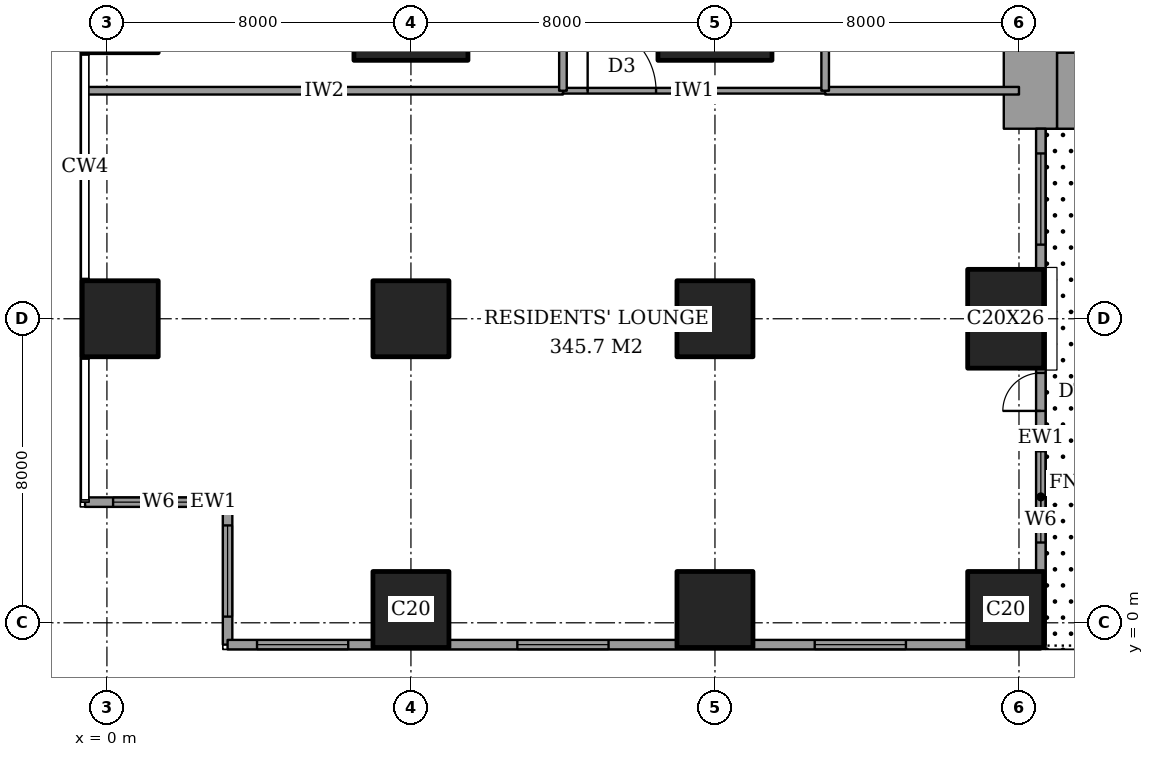
"""IFC4 building model, lengths in metres.
Left out: names, types, materials, properties, quantities, classifications, styles, units other than length and angle.
Written with IfcOpenShell. Run it as: python <this file> out.ifc"""

import sys

from ifc_helpers import new_model, si_unit, direction, frame, frame_2d, origin, origin_2d, place, context, subcontext, project, spatial, rectangle, extrude, element, fill, save


model = new_model("IFC4")
c1 = context("Model", 3, precision=1e-05, world=origin(), true_north=direction((0.0, 1.0)))
c2 = subcontext(c1, "Body", "Model", "MODEL_VIEW")
j1 = project(units=[si_unit("LENGTHUNIT", "METRE"), si_unit("PLANEANGLEUNIT", "RADIAN")], contexts=[c1])
p1 = place(None, origin())
s1 = spatial("IfcSite", under=j1, at=p1, CompositionType="ELEMENT")
p2 = place(p1, origin())
s2 = spatial("IfcBuilding", under=s1, at=p2, CompositionType="ELEMENT")
p3 = place(p2, frame((0.0, 0.0, 26.0)))
s3 = spatial("IfcBuildingStorey", under=s2, at=p3, CompositionType="ELEMENT", Elevation=26.0)
for number, where, z_axis, x_axis in (
    (1, (0.35, 8.0, 0.0), (0.0, 0.0, 1.0), (1.0, 0.0, 0.0)),
    (2, (8.0, 0.35, 0.0), (0.0, 0.0, 1.0), (1.0, 0.0, 0.0)),
    (3, (8.0, 8.0, 0.0), (0.0, 0.0, 1.0), (1.0, 0.0, 0.0)),
):
    element("IfcColumn", number, at=place(p3, frame(where, z_axis=z_axis, x_axis=x_axis)), inside=s3, PredefinedType="COLUMN", context=c2, shape_type="SweptSolid", body=[
        extrude(rectangle(XDim=2.0, YDim=2.0, at=origin_2d()), origin(), (0.0, 0.0, 1.0), 3.6),
    ])
p4 = place(p3, frame((8.0, 16.0, 0.0), z_axis=(0.0, 0.0, 1.0), x_axis=(1.0, 0.0, 0.0)))
e4 = element("IfcColumn", 4, at=p4, inside=s3, PredefinedType="COLUMN", context=c2, shape_type="SweptSolid", body=[
    extrude(rectangle(XDim=3.0, YDim=2.4, at=origin_2d()), origin(), (0.0, 0.0, 1.0), 3.6),
])
for number, where, z_axis, x_axis in (
    (5, (16.0, 0.35, 0.0), (0.0, 0.0, 1.0), (1.0, 0.0, 0.0)),
    (6, (16.0, 8.0, 0.0), (0.0, 0.0, 1.0), (1.0, 0.0, 0.0)),
):
    element("IfcColumn", number, at=place(p3, frame(where, z_axis=z_axis, x_axis=x_axis)), inside=s3, PredefinedType="COLUMN", context=c2, shape_type="SweptSolid", body=[
        extrude(rectangle(XDim=2.0, YDim=2.0, at=origin_2d()), origin(), (0.0, 0.0, 1.0), 3.6),
    ])
p5 = place(p3, frame((16.0, 16.0, 0.0), z_axis=(0.0, 0.0, 1.0), x_axis=(1.0, 0.0, 0.0)))
e7 = element("IfcColumn", 7, at=p5, inside=s3, PredefinedType="COLUMN", context=c2, shape_type="SweptSolid", body=[
    extrude(rectangle(XDim=3.0, YDim=2.4, at=origin_2d()), origin(), (0.0, 0.0, 1.0), 3.6),
])
p6 = place(p3, frame((23.65, 0.35, 0.0), z_axis=(0.0, 0.0, 1.0), x_axis=(1.0, 0.0, 0.0)))
e8 = element("IfcColumn", 8, at=p6, inside=s3, PredefinedType="COLUMN", context=c2, shape_type="SweptSolid", body=[
    extrude(rectangle(XDim=2.0, YDim=2.0, at=origin_2d()), origin(), (0.0, 0.0, 1.0), 3.6),
])
p7 = place(p3, frame((23.65, 8.0, 0.0), z_axis=(0.0, 0.0, 1.0), x_axis=(1.0, 0.0, 0.0)))
e9 = element("IfcColumn", 9, at=p7, inside=s3, PredefinedType="COLUMN", context=c2, shape_type="SweptSolid", body=[
    extrude(rectangle(XDim=2.0, YDim=2.6, at=origin_2d()), origin(), (0.0, 0.0, 1.0), 3.6),
])
p8 = place(p3, frame((25.0, 14.0, 0.0), z_axis=(0.0, 0.0, 1.0), x_axis=(1.0, 0.0, 0.0)))
e10 = element("IfcWall", 10, at=p8, inside=s3, PredefinedType="SHEAR", context=c2, shape_type="SweptSolid", body=[
    extrude(rectangle(XDim=3.15, YDim=2.0, at=frame_2d((1.575, 0.0))), origin(), (0.0, 0.0, 1.0), 3.6),
])
p9 = place(p3, frame((24.3, 13.0, 0.0), z_axis=(0.0, 0.0, 1.0), x_axis=(0.0, 1.0, 0.0)))
e11 = element("IfcWall", 11, at=p9, inside=s3, PredefinedType="SHEAR", context=c2, shape_type="SweptSolid", body=[
    extrude(rectangle(XDim=10.15, YDim=1.4, at=frame_2d((5.075, 0.0))), origin(), (0.0, 0.0, 1.0), 3.6),
])
p10 = place(p3, frame((24.575, -0.575, 0.0), z_axis=(0.0, 0.0, 1.0), x_axis=(0.0, 1.0, 0.0)))
e12 = element("IfcWall", 12, at=p10, inside=s3, PredefinedType="SOLIDWALL", context=c2, shape_type="SweptSolid", body=[
    extrude(rectangle(XDim=13.575, YDim=0.25, at=frame_2d((6.788, 0.0))), origin(), (0.0, 0.0, 1.0), 3.6),
])
p11 = place(p10, frame((6.15, 0.0, 0.0)))
e13 = element("IfcOpeningElement", 13, at=p11, cuts=e12, PredefinedType="OPENING", context=c2, shape_type="SweptSolid", body=[
    extrude(rectangle(XDim=1.0, YDim=2.4, at=frame_2d((0.5, 1.2))), frame((0.0, 0.135, 0.0), z_axis=(0.0, -1.0, 0.0), x_axis=(1.0, 0.0, 0.0)), (0.0, 0.0, 1.0), 0.27),
])
p12 = place(p10, frame((2.688, 0.0, 0.6)))
e14 = element("IfcOpeningElement", 14, at=p12, cuts=e12, PredefinedType="OPENING", context=c2, shape_type="SweptSolid", body=[
    extrude(rectangle(XDim=2.4, YDim=2.0, at=frame_2d((1.2, 1.0))), frame((0.0, 0.135, 0.0), z_axis=(0.0, -1.0, 0.0), x_axis=(1.0, 0.0, 0.0)), (0.0, 0.0, 1.0), 0.27),
])
p13 = place(p10, frame((10.525, 0.0, 0.6)))
e15 = element("IfcOpeningElement", 15, at=p13, cuts=e12, PredefinedType="OPENING", context=c2, shape_type="SweptSolid", body=[
    extrude(rectangle(XDim=2.4, YDim=2.0, at=frame_2d((1.2, 1.0))), frame((0.0, 0.135, 0.0), z_axis=(0.0, -1.0, 0.0), x_axis=(1.0, 0.0, 0.0)), (0.0, 0.0, 1.0), 0.27),
])
p14 = place(p3, frame((-0.575, 3.175, 0.0), z_axis=(0.0, 0.0, 1.0), x_axis=(1.0, 0.0, 0.0)))
e16 = element("IfcWall", 16, at=p14, inside=s3, PredefinedType="SOLIDWALL", context=c2, shape_type="SweptSolid", body=[
    extrude(rectangle(XDim=3.75, YDim=0.25, at=frame_2d((1.875, 0.0))), origin(), (0.0, 0.0, 1.0), 3.6),
])
p15 = place(p14, frame((0.738, 0.0, 0.6)))
e17 = element("IfcOpeningElement", 17, at=p15, cuts=e16, PredefinedType="OPENING", context=c2, shape_type="SweptSolid", body=[
    extrude(rectangle(XDim=2.4, YDim=2.0, at=frame_2d((1.2, 1.0))), frame((0.0, 0.135, 0.0), z_axis=(0.0, -1.0, 0.0), x_axis=(1.0, 0.0, 0.0)), (0.0, 0.0, 1.0), 0.27),
])
p16 = place(p3, frame((3.175, 3.175, 0.0), z_axis=(0.0, 0.0, 1.0), x_axis=(0.0, -1.0, 0.0)))
e18 = element("IfcWall", 18, at=p16, inside=s3, PredefinedType="SOLIDWALL", context=c2, shape_type="SweptSolid", body=[
    extrude(rectangle(XDim=3.75, YDim=0.25, at=frame_2d((1.875, 0.0))), origin(), (0.0, 0.0, 1.0), 3.6),
])
p17 = place(p16, frame((0.613, 0.0, 0.6)))
e19 = element("IfcOpeningElement", 19, at=p17, cuts=e18, PredefinedType="OPENING", context=c2, shape_type="SweptSolid", body=[
    extrude(rectangle(XDim=2.4, YDim=2.0, at=frame_2d((1.2, 1.0))), frame((0.0, 0.135, 0.0), z_axis=(0.0, -1.0, 0.0), x_axis=(1.0, 0.0, 0.0)), (0.0, 0.0, 1.0), 0.27),
])
p18 = place(p3, frame((3.175, -0.575, 0.0), z_axis=(0.0, 0.0, 1.0), x_axis=(1.0, 0.0, 0.0)))
e20 = element("IfcWall", 20, at=p18, inside=s3, PredefinedType="SOLIDWALL", context=c2, shape_type="SweptSolid", body=[
    extrude(rectangle(XDim=21.4, YDim=0.25, at=frame_2d((10.7, 0.0))), origin(), (0.0, 0.0, 1.0), 3.6),
])
p19 = place(p18, frame((0.775, 0.0, 0.6)))
e21 = element("IfcOpeningElement", 21, at=p19, cuts=e20, PredefinedType="OPENING", context=c2, shape_type="SweptSolid", body=[
    extrude(rectangle(XDim=2.4, YDim=2.0, at=frame_2d((1.2, 1.0))), frame((0.0, 0.135, 0.0), z_axis=(0.0, -1.0, 0.0), x_axis=(1.0, 0.0, 0.0)), (0.0, 0.0, 1.0), 0.27),
])
p20 = place(p18, frame((7.625, 0.0, 0.6)))
e22 = element("IfcOpeningElement", 22, at=p20, cuts=e20, PredefinedType="OPENING", context=c2, shape_type="SweptSolid", body=[
    extrude(rectangle(XDim=2.4, YDim=2.0, at=frame_2d((1.2, 1.0))), frame((0.0, 0.135, 0.0), z_axis=(0.0, -1.0, 0.0), x_axis=(1.0, 0.0, 0.0)), (0.0, 0.0, 1.0), 0.27),
])
p21 = place(p18, frame((15.45, 0.0, 0.6)))
e23 = element("IfcOpeningElement", 23, at=p21, cuts=e20, PredefinedType="OPENING", context=c2, shape_type="SweptSolid", body=[
    extrude(rectangle(XDim=2.4, YDim=2.0, at=frame_2d((1.2, 1.0))), frame((0.0, 0.135, 0.0), z_axis=(0.0, -1.0, 0.0), x_axis=(1.0, 0.0, 0.0)), (0.0, 0.0, 1.0), 0.27),
])
p22 = place(p3, frame((-0.561, 14.0, 0.0), z_axis=(0.0, 0.0, 1.0), x_axis=(1.0, 0.0, 0.0)))
e24 = element("IfcWall", 24, at=p22, inside=s3, PredefinedType="PARTITIONING", context=c2, shape_type="SweptSolid", body=[
    extrude(rectangle(XDim=12.561, YDim=0.2, at=frame_2d((6.281, 0.0))), origin(), (0.0, 0.0, 1.0), 3.35),
])
p23 = place(p3, frame((18.9, 14.0, 0.0), z_axis=(0.0, 0.0, 1.0), x_axis=(1.0, 0.0, 0.0)))
e25 = element("IfcWall", 25, at=p23, inside=s3, PredefinedType="PARTITIONING", context=c2, shape_type="SweptSolid", body=[
    extrude(rectangle(XDim=5.1, YDim=0.2, at=frame_2d((2.55, 0.0))), origin(), (0.0, 0.0, 1.0), 3.35),
])
p24 = place(p3, frame((12.0, 14.0, 0.0), z_axis=(0.0, 0.0, 1.0), x_axis=(1.0, 0.0, 0.0)))
e26 = element("IfcWall", 26, at=p24, inside=s3, PredefinedType="PARTITIONING", context=c2, shape_type="SweptSolid", body=[
    extrude(rectangle(XDim=6.9, YDim=0.15, at=frame_2d((3.45, 0.0))), origin(), (0.0, 0.0, 1.0), 3.35),
])
p25 = place(p24, frame((0.65, 0.0, 0.0)))
e27 = element("IfcOpeningElement", 27, at=p25, cuts=e26, PredefinedType="OPENING", context=c2, shape_type="SweptSolid", body=[
    extrude(rectangle(XDim=1.8, YDim=2.1, at=frame_2d((0.9, 1.05))), frame((0.0, 0.085, 0.0), z_axis=(0.0, -1.0, 0.0), x_axis=(1.0, 0.0, 0.0)), (0.0, 0.0, 1.0), 0.17),
])
p26 = place(p3, frame((12.0, 14.0, 0.0), z_axis=(0.0, 0.0, 1.0), x_axis=(0.0, 1.0, 0.0)))
e28 = element("IfcWall", 28, at=p26, inside=s3, PredefinedType="PARTITIONING", context=c2, shape_type="SweptSolid", body=[
    extrude(rectangle(XDim=12.0, YDim=0.2, at=frame_2d((6.0, 0.0))), origin(), (0.0, 0.0, 1.0), 3.35),
])
p27 = place(p26, frame((5.5, 0.0, 0.0)))
e29 = element("IfcOpeningElement", 29, at=p27, cuts=e28, PredefinedType="OPENING", context=c2, shape_type="SweptSolid", body=[
    extrude(rectangle(XDim=1.0, YDim=2.1, at=frame_2d((0.5, 1.05))), frame((0.0, 0.11, 0.0), z_axis=(0.0, -1.0, 0.0), x_axis=(1.0, 0.0, 0.0)), (0.0, 0.0, 1.0), 0.22),
])
p28 = place(p3, frame((18.9, 14.0, 0.0), z_axis=(0.0, 0.0, 1.0), x_axis=(0.0, 1.0, 0.0)))
e30 = element("IfcWall", 30, at=p28, inside=s3, PredefinedType="PARTITIONING", context=c2, shape_type="SweptSolid", body=[
    extrude(rectangle(XDim=6.0, YDim=0.2, at=frame_2d((3.0, 0.0))), origin(), (0.0, 0.0, 1.0), 3.35),
])
p29 = place(p28, frame((1.3, 0.0, 0.0)))
e31 = element("IfcOpeningElement", 31, at=p29, cuts=e30, PredefinedType="OPENING", context=c2, shape_type="SweptSolid", body=[
    extrude(rectangle(XDim=0.9, YDim=2.1, at=frame_2d((0.45, 1.05))), frame((0.0, 0.11, 0.0), z_axis=(0.0, -1.0, 0.0), x_axis=(1.0, 0.0, 0.0)), (0.0, 0.0, 1.0), 0.22),
])
p30 = place(p28, frame((4.3, 0.0, 0.0)))
e32 = element("IfcOpeningElement", 32, at=p30, cuts=e30, PredefinedType="OPENING", context=c2, shape_type="SweptSolid", body=[
    extrude(rectangle(XDim=0.9, YDim=2.1, at=frame_2d((0.45, 1.05))), frame((0.0, 0.11, 0.0), z_axis=(0.0, -1.0, 0.0), x_axis=(1.0, 0.0, 0.0)), (0.0, 0.0, 1.0), 0.22),
])
p31 = place(p11, origin())
e33 = element("IfcDoor", 33, at=p31, inside=s3, OperationType="SINGLE_SWING_RIGHT", PredefinedType="DOOR", context=c2, shape_type="SweptSolid", body=[
    extrude(rectangle(XDim=1.0, YDim=2.4, at=frame_2d((0.5, 1.2))), frame((0.0, 0.025, 0.0), z_axis=(0.0, -1.0, 0.0), x_axis=(1.0, 0.0, 0.0)), (0.0, 0.0, 1.0), 0.05),
])
fill(e13, e33)
p32 = place(p12, origin())
e34 = element("IfcWindow", 34, at=p32, inside=s3, PartitioningType="SINGLE_PANEL", PredefinedType="WINDOW", context=c2, shape_type="SweptSolid", body=[
    extrude(rectangle(XDim=2.4, YDim=2.0, at=frame_2d((1.2, 1.0))), frame((0.0, 0.03, 0.0), z_axis=(0.0, -1.0, 0.0), x_axis=(1.0, 0.0, 0.0)), (0.0, 0.0, 1.0), 0.06),
])
fill(e14, e34)
p33 = place(p13, origin())
e35 = element("IfcWindow", 35, at=p33, inside=s3, PartitioningType="SINGLE_PANEL", PredefinedType="WINDOW", context=c2, shape_type="SweptSolid", body=[
    extrude(rectangle(XDim=2.4, YDim=2.0, at=frame_2d((1.2, 1.0))), frame((0.0, 0.03, 0.0), z_axis=(0.0, -1.0, 0.0), x_axis=(1.0, 0.0, 0.0)), (0.0, 0.0, 1.0), 0.06),
])
fill(e15, e35)
p34 = place(p15, origin())
e36 = element("IfcWindow", 36, at=p34, inside=s3, PartitioningType="SINGLE_PANEL", PredefinedType="WINDOW", context=c2, shape_type="SweptSolid", body=[
    extrude(rectangle(XDim=2.4, YDim=2.0, at=frame_2d((1.2, 1.0))), frame((0.0, 0.03, 0.0), z_axis=(0.0, -1.0, 0.0), x_axis=(1.0, 0.0, 0.0)), (0.0, 0.0, 1.0), 0.06),
])
fill(e17, e36)
p35 = place(p17, origin())
e37 = element("IfcWindow", 37, at=p35, inside=s3, PartitioningType="SINGLE_PANEL", PredefinedType="WINDOW", context=c2, shape_type="SweptSolid", body=[
    extrude(rectangle(XDim=2.4, YDim=2.0, at=frame_2d((1.2, 1.0))), frame((0.0, 0.03, 0.0), z_axis=(0.0, -1.0, 0.0), x_axis=(1.0, 0.0, 0.0)), (0.0, 0.0, 1.0), 0.06),
])
fill(e19, e37)
p36 = place(p19, origin())
e38 = element("IfcWindow", 38, at=p36, inside=s3, PartitioningType="SINGLE_PANEL", PredefinedType="WINDOW", context=c2, shape_type="SweptSolid", body=[
    extrude(rectangle(XDim=2.4, YDim=2.0, at=frame_2d((1.2, 1.0))), frame((0.0, 0.03, 0.0), z_axis=(0.0, -1.0, 0.0), x_axis=(1.0, 0.0, 0.0)), (0.0, 0.0, 1.0), 0.06),
])
fill(e21, e38)
p37 = place(p20, origin())
e39 = element("IfcWindow", 39, at=p37, inside=s3, PartitioningType="SINGLE_PANEL", PredefinedType="WINDOW", context=c2, shape_type="SweptSolid", body=[
    extrude(rectangle(XDim=2.4, YDim=2.0, at=frame_2d((1.2, 1.0))), frame((0.0, 0.03, 0.0), z_axis=(0.0, -1.0, 0.0), x_axis=(1.0, 0.0, 0.0)), (0.0, 0.0, 1.0), 0.06),
])
fill(e22, e39)
p38 = place(p21, origin())
e40 = element("IfcWindow", 40, at=p38, inside=s3, PartitioningType="SINGLE_PANEL", PredefinedType="WINDOW", context=c2, shape_type="SweptSolid", body=[
    extrude(rectangle(XDim=2.4, YDim=2.0, at=frame_2d((1.2, 1.0))), frame((0.0, 0.03, 0.0), z_axis=(0.0, -1.0, 0.0), x_axis=(1.0, 0.0, 0.0)), (0.0, 0.0, 1.0), 0.06),
])
fill(e23, e40)
p39 = place(p25, origin())
e41 = element("IfcDoor", 41, at=p39, inside=s3, OperationType="DOUBLE_DOOR_DOUBLE_SWING", PredefinedType="DOOR", context=c2, shape_type="SweptSolid", body=[
    extrude(rectangle(XDim=1.8, YDim=2.1, at=frame_2d((0.9, 1.05))), frame((0.0, 0.025, 0.0), z_axis=(0.0, -1.0, 0.0), x_axis=(1.0, 0.0, 0.0)), (0.0, 0.0, 1.0), 0.05),
])
fill(e27, e41)
save(model, sys.argv[1])
